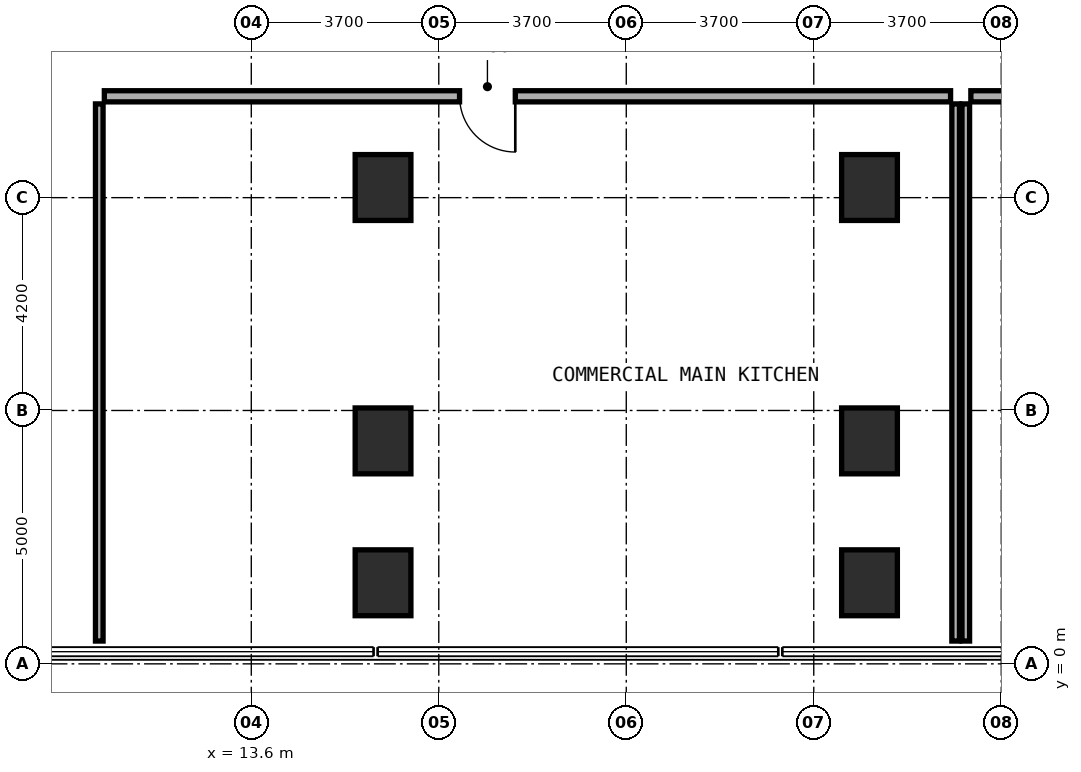
"""IFC4 building model, lengths in metres.
Left out: names, types, materials, properties, quantities, classifications, styles, units other than length and angle.
Written with IfcOpenShell. Run it as: python <this file> out.ifc"""

import sys

from ifc_helpers import new_model, si_unit, direction, frame, frame_2d, origin, origin_2d, place, context, subcontext, project, spatial, rectangle, extrude, element, fill, save


model = new_model("IFC4")
c1 = context("Model", 3, precision=1e-05, world=origin(), true_north=direction((0.0, 1.0)))
c2 = subcontext(c1, "Body", "Model", "MODEL_VIEW")
j1 = project(units=[si_unit("LENGTHUNIT", "METRE"), si_unit("PLANEANGLEUNIT", "RADIAN")], contexts=[c1])
p1 = place(None, origin())
s1 = spatial("IfcSite", under=j1, at=p1, CompositionType="ELEMENT")
p2 = place(p1, origin())
s2 = spatial("IfcBuilding", under=s1, at=p2, CompositionType="ELEMENT")
p3 = place(p2, frame((0.0, 0.0, 5.4)))
s3 = spatial("IfcBuildingStorey", under=s2, at=p3, CompositionType="ELEMENT", Elevation=5.4)
for number, where, z_axis, x_axis in (
    (1, (16.2, 9.4, 0.0), (0.0, 0.0, 1.0), (1.0, 0.0, 0.0)),
    (2, (25.8, 9.4, 0.0), (0.0, 0.0, 1.0), (1.0, 0.0, 0.0)),
    (3, (16.2, 1.6, 0.0), (0.0, 0.0, 1.0), (1.0, 0.0, 0.0)),
    (4, (25.8, 1.6, 0.0), (0.0, 0.0, 1.0), (1.0, 0.0, 0.0)),
    (5, (16.2, 4.4, 0.0), (0.0, 0.0, 1.0), (1.0, 0.0, 0.0)),
    (6, (25.8, 4.4, 0.0), (0.0, 0.0, 1.0), (1.0, 0.0, 0.0)),
):
    element("IfcColumn", number, at=place(p3, frame(where, z_axis=z_axis, x_axis=x_axis)), inside=s3, PredefinedType="COLUMN", context=c2, shape_type="SweptSolid", body=[
        extrude(rectangle(XDim=1.1, YDim=1.3, at=origin_2d()), origin(), (0.0, 0.0, 1.0), 4.8),
    ])
p4 = place(p3, frame((10.6, 0.45, 0.0), z_axis=(0.0, 0.0, 1.0), x_axis=(0.0, 1.0, 0.0)))
e7 = element("IfcWall", 7, at=p4, inside=s3, PredefinedType="PARTITIONING", context=c2, shape_type="SweptSolid", body=[
    extrude(rectangle(XDim=10.6, YDim=0.15, at=frame_2d((5.3, 0.0))), origin(), (0.0, 0.0, 1.0), 3.625),
])
p5 = place(p3, frame((27.5, 0.45, 0.0), z_axis=(0.0, 0.0, 1.0), x_axis=(0.0, 1.0, 0.0)))
e8 = element("IfcWall", 8, at=p5, inside=s3, PredefinedType="PARTITIONING", context=c2, shape_type="SweptSolid", body=[
    extrude(rectangle(XDim=10.6, YDim=0.15, at=frame_2d((5.3, 0.0))), origin(), (0.0, 0.0, 1.0), 3.975),
])
p6 = place(p3, frame((10.7, 11.2, 0.0), z_axis=(0.0, 0.0, 1.0), x_axis=(1.0, 0.0, 0.0)))
e9 = element("IfcWall", 9, at=p6, inside=s3, PredefinedType="SOLIDWALL", context=c2, shape_type="SweptSolid", body=[
    extrude(rectangle(XDim=16.7, YDim=0.22, at=frame_2d((8.35, 0.0))), origin(), (0.0, 0.0, 1.0), 3.525),
])
p7 = place(p6, frame((7.01, 0.0, 0.0)))
e10 = element("IfcOpeningElement", 10, at=p7, cuts=e9, PredefinedType="OPENING", context=c2, shape_type="SweptSolid", body=[
    extrude(rectangle(XDim=1.1, YDim=2.1, at=frame_2d((0.55, 1.05))), frame((0.0, 0.12, 0.0), z_axis=(0.0, -1.0, 0.0), x_axis=(1.0, 0.0, 0.0)), (0.0, 0.0, 1.0), 0.24),
])
p8 = place(p3, frame((27.7, 0.45, 0.0), z_axis=(0.0, 0.0, 1.0), x_axis=(0.0, 1.0, 0.0)))
e11 = element("IfcWall", 11, at=p8, inside=s3, PredefinedType="PARTITIONING", context=c2, shape_type="SweptSolid", body=[
    extrude(rectangle(XDim=10.6, YDim=0.15, at=frame_2d((5.3, 0.0))), origin(), (0.0, 0.0, 1.0), 3.975),
])
p9 = place(p3, frame((27.8, 11.2, 0.0), z_axis=(0.0, 0.0, 1.0), x_axis=(1.0, 0.0, 0.0)))
e12 = element("IfcWall", 12, at=p9, inside=s3, PredefinedType="SOLIDWALL", context=c2, shape_type="SweptSolid", body=[
    extrude(rectangle(XDim=24.1, YDim=0.22, at=frame_2d((12.05, 0.0))), origin(), (0.0, 0.0, 1.0), 3.725),
])
p10 = place(p9, frame((10.34, 0.0, 0.0)))
e13 = element("IfcOpeningElement", 13, at=p10, cuts=e12, PredefinedType="OPENING", context=c2, shape_type="SweptSolid", body=[
    extrude(rectangle(XDim=1.1, YDim=2.1, at=frame_2d((0.55, 1.05))), frame((0.0, 0.12, 0.0), z_axis=(0.0, -1.0, 0.0), x_axis=(1.0, 0.0, 0.0)), (0.0, 0.0, 1.0), 0.24),
])
p11 = place(p7, frame((1.1, 0.0, 0.0), z_axis=(0.0, 0.0, 1.0), x_axis=(-1.0, 0.0, 0.0)))
e14 = element("IfcDoor", 14, at=p11, inside=s3, OperationType="SINGLE_SWING_LEFT", PredefinedType="DOOR", context=c2, shape_type="SweptSolid", body=[
    extrude(rectangle(XDim=1.1, YDim=2.1, at=frame_2d((0.55, 1.05))), frame((0.0, 0.025, 0.0), z_axis=(0.0, -1.0, 0.0), x_axis=(1.0, 0.0, 0.0)), (0.0, 0.0, 1.0), 0.05),
])
fill(e10, e14)
save(model, sys.argv[1])
